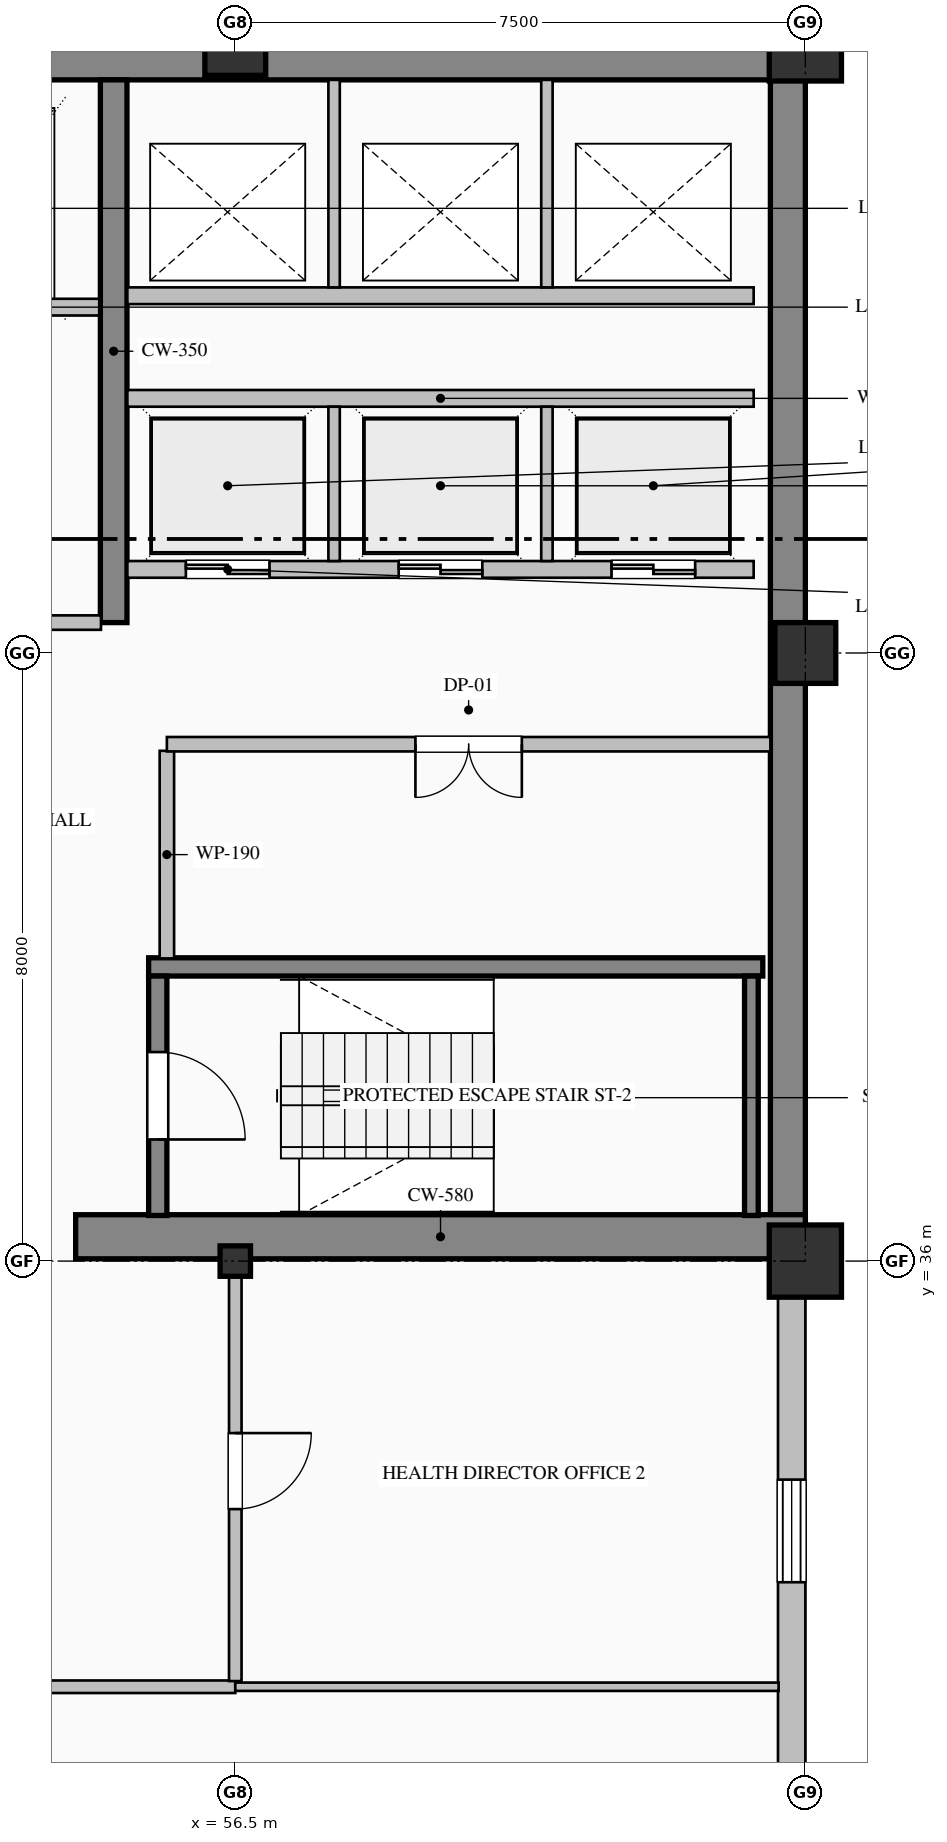
"""IFC4 building model, lengths in metres.
Left out: names, types, materials, properties, quantities, classifications, styles, units other than length and angle.
Written with IfcOpenShell. Run it as: python <this file> out.ifc"""

import sys

from ifc_helpers import new_model, si_unit, direction, frame, frame_2d, origin, origin_2d, place, context, subcontext, project, spatial, rectangle, hollow_rectangle, i_section, extrude, element, fill, save


model = new_model("IFC4")
c1 = context("Model", 3, precision=1e-05, world=origin(), true_north=direction((0.0, 1.0)))
c2 = subcontext(c1, "Body", "Model", "MODEL_VIEW")
j1 = project(units=[si_unit("LENGTHUNIT", "METRE"), si_unit("PLANEANGLEUNIT", "RADIAN")], contexts=[c1])
p1 = place(None, origin())
s1 = spatial("IfcSite", under=j1, at=p1, CompositionType="ELEMENT")
p2 = place(p1, origin())
s2 = spatial("IfcBuilding", under=s1, at=p2, CompositionType="ELEMENT")
p3 = place(p2, frame((0.0, 0.0, 253.8)))
s3 = spatial("IfcBuildingStorey", under=s2, at=p3, CompositionType="ELEMENT", Elevation=253.8)
p4 = place(p3, frame((40.5, 51.77, 0.0), z_axis=(0.0, 0.0, 1.0), x_axis=(1.0, 0.0, 0.0)))
e1 = element("IfcWall", 1, at=p4, inside=s3, PredefinedType="SHEAR", context=c2, shape_type="SweptSolid", body=[
    extrude(rectangle(XDim=23.5, YDim=0.46, at=frame_2d((11.75, 0.0))), origin(), (0.0, 0.0, 1.0), 3.775),
])
p5 = place(p3, frame((63.77, 36.32, 0.0), z_axis=(0.0, 0.0, 1.0), x_axis=(0.0, 1.0, 0.0)))
e2 = element("IfcWall", 2, at=p5, inside=s3, PredefinedType="SHEAR", context=c2, shape_type="SweptSolid", body=[
    extrude(rectangle(XDim=15.22, YDim=0.46, at=frame_2d((7.61, 0.0))), origin(), (0.0, 0.0, 1.0), 3.775),
])
p6 = place(p3, frame((54.4, 36.32, 0.0), z_axis=(0.0, 0.0, 1.0), x_axis=(1.0, 0.0, 0.0)))
e3 = element("IfcWall", 3, at=p6, inside=s3, PredefinedType="SHEAR", context=c2, shape_type="SweptSolid", body=[
    extrude(rectangle(XDim=9.6, YDim=0.58, at=frame_2d((4.8, 0.0))), origin(), (0.0, 0.0, 1.0), 4.0),
])
p7 = place(p3, frame((54.9, 44.4, 0.0), z_axis=(0.0, 0.0, 1.0), x_axis=(0.0, 1.0, 0.0)))
e4 = element("IfcWall", 4, at=p7, inside=s3, PredefinedType="SHEAR", context=c2, shape_type="SweptSolid", body=[
    extrude(rectangle(XDim=7.14, YDim=0.35, at=frame_2d((3.57, 0.0))), origin(), (0.0, 0.0, 1.0), 3.775),
])
p8 = place(p3, frame((56.5, 36.0, 0.0), z_axis=(0.0, 0.0, 1.0), x_axis=(1.0, 0.0, 0.0)))
e5 = element("IfcColumn", 5, at=p8, inside=s3, PredefinedType="COLUMN", context=c2, shape_type="SweptSolid", body=[
    extrude(i_section(OverallWidth=0.4, OverallDepth=0.4, WebThickness=0.013, FlangeThickness=0.021, FilletRadius=0.022, at=origin_2d()), origin(), (0.0, 0.0, 1.0), 4.0),
])
p9 = place(p3, frame((56.5, 52.0, 0.0), z_axis=(0.0, 0.0, 1.0), x_axis=(1.0, 0.0, 0.0)))
e6 = element("IfcColumn", 6, at=p9, inside=s3, PredefinedType="COLUMN", context=c2, shape_type="SweptSolid", body=[
    extrude(hollow_rectangle(XDim=0.8, YDim=0.8, WallThickness=0.032, at=origin_2d()), origin(), (0.0, 0.0, 1.0), 4.0),
])
p10 = place(p3, frame((64.0, 36.0, 0.0), z_axis=(0.0, 0.0, 1.0), x_axis=(1.0, 0.0, 0.0)))
e7 = element("IfcColumn", 7, at=p10, inside=s3, PredefinedType="COLUMN", context=c2, shape_type="SweptSolid", body=[
    extrude(hollow_rectangle(XDim=0.95, YDim=0.95, WallThickness=0.036, at=origin_2d()), origin(), (0.0, 0.0, 1.0), 4.0),
])
p11 = place(p3, frame((64.0, 44.0, 0.0), z_axis=(0.0, 0.0, 1.0), x_axis=(1.0, 0.0, 0.0)))
e8 = element("IfcColumn", 8, at=p11, inside=s3, PredefinedType="COLUMN", context=c2, shape_type="SweptSolid", body=[
    extrude(hollow_rectangle(XDim=0.8, YDim=0.8, WallThickness=0.032, at=origin_2d()), origin(), (0.0, 0.0, 1.0), 4.0),
])
p12 = place(p3, frame((64.0, 52.0, 0.0), z_axis=(0.0, 0.0, 1.0), x_axis=(1.0, 0.0, 0.0)))
e9 = element("IfcColumn", 9, at=p12, inside=s3, PredefinedType="COLUMN", context=c2, shape_type="SweptSolid", body=[
    extrude(hollow_rectangle(XDim=0.95, YDim=0.95, WallThickness=0.036, at=origin_2d()), origin(), (0.0, 0.0, 1.0), 4.0),
])
p13 = place(p3, frame((63.82, 36.05, 0.0), z_axis=(0.0, 0.0, 1.0), x_axis=(0.0, -1.0, 0.0)))
e10 = element("IfcWall", 10, at=p13, inside=s3, PredefinedType="SOLIDWALL", context=c2, shape_type="SweptSolid", body=[
    extrude(rectangle(XDim=19.55, YDim=0.36, at=frame_2d((9.775, 0.0))), origin(), (0.0, 0.0, 1.0), 3.325),
])
p14 = place(p13, frame((2.925, 0.0, 0.9)))
e11 = element("IfcOpeningElement", 11, at=p14, cuts=e10, PredefinedType="OPENING", context=c2, shape_type="SweptSolid", body=[
    extrude(rectangle(XDim=1.35, YDim=1.85, at=frame_2d((0.675, 0.925))), frame((0.0, 0.19, 0.0), z_axis=(0.0, -1.0, 0.0), x_axis=(1.0, 0.0, 0.0)), (0.0, 0.0, 1.0), 0.38),
])
p15 = place(p13, frame((10.2, 0.0, 0.9)))
e12 = element("IfcOpeningElement", 12, at=p15, cuts=e10, PredefinedType="OPENING", context=c2, shape_type="SweptSolid", body=[
    extrude(rectangle(XDim=1.2, YDim=1.85, at=frame_2d((0.6, 0.925))), frame((0.0, 0.19, 0.0), z_axis=(0.0, -1.0, 0.0), x_axis=(1.0, 0.0, 0.0)), (0.0, 0.0, 1.0), 0.38),
])
p16 = place(p13, frame((13.725, 0.0, 0.9)))
e13 = element("IfcOpeningElement", 13, at=p16, cuts=e10, PredefinedType="OPENING", context=c2, shape_type="SweptSolid", body=[
    extrude(rectangle(XDim=1.35, YDim=1.85, at=frame_2d((0.675, 0.925))), frame((0.0, 0.19, 0.0), z_axis=(0.0, -1.0, 0.0), x_axis=(1.0, 0.0, 0.0)), (0.0, 0.0, 1.0), 0.38),
])
p17 = place(p3, frame((55.36, 39.87, 0.0), z_axis=(0.0, 0.0, 1.0), x_axis=(1.0, 0.0, 0.0)))
e14 = element("IfcWall", 14, at=p17, inside=s3, PredefinedType="SOLIDWALL", context=c2, shape_type="SweptSolid", body=[
    extrude(rectangle(XDim=8.08, YDim=0.24, at=frame_2d((4.04, 0.0))), origin(), (0.0, 0.0, 1.0), 4.0),
])
p18 = place(p3, frame((55.48, 39.75, 0.0), z_axis=(0.0, 0.0, 1.0), x_axis=(0.0, -1.0, 0.0)))
e15 = element("IfcWall", 15, at=p18, inside=s3, PredefinedType="SOLIDWALL", context=c2, shape_type="SweptSolid", body=[
    extrude(rectangle(XDim=3.15, YDim=0.24, at=frame_2d((1.575, 0.0))), origin(), (0.0, 0.0, 1.0), 4.0),
])
p19 = place(p18, frame((1.0, 0.0, 0.0)))
e16 = element("IfcOpeningElement", 16, at=p19, cuts=e15, PredefinedType="OPENING", context=c2, shape_type="SweptSolid", body=[
    extrude(rectangle(XDim=1.15, YDim=2.2, at=frame_2d((0.575, 1.1))), frame((0.0, 0.13, 0.0), z_axis=(0.0, -1.0, 0.0), x_axis=(1.0, 0.0, 0.0)), (0.0, 0.0, 1.0), 0.26),
])
p20 = place(p3, frame((63.29, 36.6, 0.0), z_axis=(0.0, 0.0, 1.0), x_axis=(0.0, 1.0, 0.0)))
e17 = element("IfcWall", 17, at=p20, inside=s3, PredefinedType="SOLIDWALL", context=c2, shape_type="SweptSolid", body=[
    extrude(rectangle(XDim=3.15, YDim=0.18, at=frame_2d((1.575, 0.0))), origin(), (0.0, 0.0, 1.0), 4.0),
])
p21 = place(p3, frame((54.71, 48.55, 0.0), z_axis=(0.0, 0.0, 1.0), x_axis=(-1.0, 0.0, 0.0)))
e18 = element("IfcWall", 18, at=p21, inside=s3, PredefinedType="PARTITIONING", context=c2, shape_type="SweptSolid", body=[
    extrude(rectangle(XDim=5.12, YDim=0.22, at=frame_2d((2.56, 0.0))), origin(), (0.0, 0.0, 1.0), 3.775),
])
p22 = place(p21, frame((3.735, 0.0, 0.0)))
e19 = element("IfcOpeningElement", 19, at=p22, cuts=e18, PredefinedType="OPENING", context=c2, shape_type="SweptSolid", body=[
    extrude(rectangle(XDim=1.15, YDim=2.2, at=frame_2d((0.575, 1.1))), frame((0.0, 0.12, 0.0), z_axis=(0.0, -1.0, 0.0), x_axis=(1.0, 0.0, 0.0)), (0.0, 0.0, 1.0), 0.24),
])
p23 = place(p21, frame((0.935, 0.0, 0.0)))
e20 = element("IfcOpeningElement", 20, at=p23, cuts=e18, PredefinedType="OPENING", context=c2, shape_type="SweptSolid", body=[
    extrude(rectangle(XDim=1.15, YDim=2.2, at=frame_2d((0.575, 1.1))), frame((0.0, 0.12, 0.0), z_axis=(0.0, -1.0, 0.0), x_axis=(1.0, 0.0, 0.0)), (0.0, 0.0, 1.0), 0.24),
])
p24 = place(p3, frame((63.32, 45.1, 0.0), z_axis=(0.0, 0.0, 1.0), x_axis=(-1.0, 0.0, 0.0)))
e21 = element("IfcWall", 21, at=p24, inside=s3, PredefinedType="PARTITIONING", context=c2, shape_type="SweptSolid", body=[
    extrude(rectangle(XDim=8.24, YDim=0.22, at=frame_2d((4.12, 0.0))), origin(), (0.0, 0.0, 1.0), 3.775),
])
p25 = place(p24, frame((6.37, 0.0, 0.0)))
e22 = element("IfcOpeningElement", 22, at=p25, cuts=e21, PredefinedType="OPENING", context=c2, shape_type="SweptSolid", body=[
    extrude(rectangle(XDim=1.1, YDim=2.2, at=frame_2d((0.55, 1.1))), frame((0.0, 0.12, 0.0), z_axis=(0.0, -1.0, 0.0), x_axis=(1.0, 0.0, 0.0)), (0.0, 0.0, 1.0), 0.24),
])
p26 = place(p24, frame((3.57, 0.0, 0.0)))
e23 = element("IfcOpeningElement", 23, at=p26, cuts=e21, PredefinedType="OPENING", context=c2, shape_type="SweptSolid", body=[
    extrude(rectangle(XDim=1.1, YDim=2.2, at=frame_2d((0.55, 1.1))), frame((0.0, 0.12, 0.0), z_axis=(0.0, -1.0, 0.0), x_axis=(1.0, 0.0, 0.0)), (0.0, 0.0, 1.0), 0.24),
])
p27 = place(p24, frame((0.77, 0.0, 0.0)))
e24 = element("IfcOpeningElement", 24, at=p27, cuts=e21, PredefinedType="OPENING", context=c2, shape_type="SweptSolid", body=[
    extrude(rectangle(XDim=1.1, YDim=2.2, at=frame_2d((0.55, 1.1))), frame((0.0, 0.12, 0.0), z_axis=(0.0, -1.0, 0.0), x_axis=(1.0, 0.0, 0.0)), (0.0, 0.0, 1.0), 0.24),
])
p28 = place(p3, frame((55.08, 47.35, 0.0), z_axis=(0.0, 0.0, 1.0), x_axis=(1.0, 0.0, 0.0)))
e25 = element("IfcWall", 25, at=p28, inside=s3, PredefinedType="PARTITIONING", context=c2, shape_type="SweptSolid", body=[
    extrude(rectangle(XDim=8.24, YDim=0.22, at=frame_2d((4.12, 0.0))), origin(), (0.0, 0.0, 1.0), 3.775),
])
for number, where, z_axis, x_axis in (
    (26, (57.8, 45.21, 0.0), (0.0, 0.0, 1.0), (0.0, 1.0, 0.0)),
    (27, (60.6, 45.21, 0.0), (0.0, 0.0, 1.0), (0.0, 1.0, 0.0)),
):
    element("IfcWall", number, at=place(p3, frame(where, z_axis=z_axis, x_axis=x_axis)), inside=s3, PredefinedType="PARTITIONING", context=c2, shape_type="SweptSolid", body=[
        extrude(rectangle(XDim=2.03, YDim=0.15, at=frame_2d((1.015, 0.0))), origin(), (0.0, 0.0, 1.0), 3.775),
    ])
p29 = place(p3, frame((63.32, 48.7, 0.0), z_axis=(0.0, 0.0, 1.0), x_axis=(-1.0, 0.0, 0.0)))
e28 = element("IfcWall", 28, at=p29, inside=s3, PredefinedType="PARTITIONING", context=c2, shape_type="SweptSolid", body=[
    extrude(rectangle(XDim=8.24, YDim=0.22, at=frame_2d((4.12, 0.0))), origin(), (0.0, 0.0, 1.0), 3.775),
])
for number, where, z_axis, x_axis in (
    (29, (57.8, 48.81, 0.0), (0.0, 0.0, 1.0), (0.0, 1.0, 0.0)),
    (30, (60.6, 48.81, 0.0), (0.0, 0.0, 1.0), (0.0, 1.0, 0.0)),
):
    element("IfcWall", number, at=place(p3, frame(where, z_axis=z_axis, x_axis=x_axis)), inside=s3, PredefinedType="PARTITIONING", context=c2, shape_type="SweptSolid", body=[
        extrude(rectangle(XDim=2.73, YDim=0.15, at=frame_2d((1.365, 0.0))), origin(), (0.0, 0.0, 1.0), 3.775),
    ])
p30 = place(p3, frame((54.733, 44.4, 0.0), z_axis=(0.0, 0.0, 1.0), x_axis=(-1.0, 0.0, 0.0)))
e31 = element("IfcWall", 31, at=p30, inside=s3, PredefinedType="PARTITIONING", context=c2, shape_type="SweptSolid", body=[
    extrude(rectangle(XDim=5.166, YDim=0.19, at=frame_2d((2.583, 0.0))), origin(), (0.0, 0.0, 1.0), 3.775),
])
p31 = place(p30, frame((2.058, 0.0, 0.0)))
e32 = element("IfcOpeningElement", 32, at=p31, cuts=e31, PredefinedType="OPENING", context=c2, shape_type="SweptSolid", body=[
    extrude(rectangle(XDim=1.05, YDim=2.15, at=frame_2d((0.525, 1.075))), frame((0.0, 0.105, 0.0), z_axis=(0.0, -1.0, 0.0), x_axis=(1.0, 0.0, 0.0)), (0.0, 0.0, 1.0), 0.21),
])
p32 = place(p3, frame((55.6, 42.713, 0.0), z_axis=(0.0, 0.0, 1.0), x_axis=(0.0, -1.0, 0.0)))
e33 = element("IfcWall", 33, at=p32, inside=s3, PredefinedType="PARTITIONING", context=c2, shape_type="SweptSolid", body=[
    extrude(rectangle(XDim=2.731, YDim=0.19, at=frame_2d((1.365, 0.0))), origin(), (0.0, 0.0, 1.0), 3.775),
])
p33 = place(p3, frame((63.54, 42.8, 0.0), z_axis=(0.0, 0.0, 1.0), x_axis=(-1.0, 0.0, 0.0)))
e34 = element("IfcWall", 34, at=p33, inside=s3, PredefinedType="PARTITIONING", context=c2, shape_type="SweptSolid", body=[
    extrude(rectangle(XDim=7.94, YDim=0.19, at=frame_2d((3.97, 0.0))), origin(), (0.0, 0.0, 1.0), 3.775),
])
p34 = place(p33, frame((3.27, 0.0, 0.0)))
e35 = element("IfcOpeningElement", 35, at=p34, cuts=e34, PredefinedType="OPENING", context=c2, shape_type="SweptSolid", body=[
    extrude(rectangle(XDim=1.4, YDim=2.25, at=frame_2d((0.7, 1.125))), frame((0.0, 0.105, 0.0), z_axis=(0.0, -1.0, 0.0), x_axis=(1.0, 0.0, 0.0)), (0.0, 0.0, 1.0), 0.21),
])
p35 = place(p3, frame((56.5, 30.4, 0.0), z_axis=(0.0, 0.0, 1.0), x_axis=(-1.0, 0.0, 0.0)))
e36 = element("IfcWall", 36, at=p35, inside=s3, PredefinedType="PARTITIONING", context=c2, shape_type="SweptSolid", body=[
    extrude(rectangle(XDim=11.3, YDim=0.165, at=frame_2d((5.65, 0.0))), origin(), (0.0, 0.0, 1.0), 3.775),
])
p36 = place(p3, frame((56.5, 36.0, 0.0), z_axis=(0.0, 0.0, 1.0), x_axis=(0.0, -1.0, 0.0)))
e37 = element("IfcWall", 37, at=p36, inside=s3, PredefinedType="PARTITIONING", context=c2, shape_type="SweptSolid", body=[
    extrude(rectangle(XDim=5.525, YDim=0.165, at=frame_2d((2.763, 0.0))), origin(), (0.0, 0.0, 1.0), 3.179),
])
p37 = place(p36, frame((2.263, 0.0, 0.0)))
e38 = element("IfcOpeningElement", 38, at=p37, cuts=e37, PredefinedType="OPENING", context=c2, shape_type="SweptSolid", body=[
    extrude(rectangle(XDim=1.0, YDim=2.15, at=frame_2d((0.5, 1.075))), frame((0.0, 0.093, 0.0), z_axis=(0.0, -1.0, 0.0), x_axis=(1.0, 0.0, 0.0)), (0.0, 0.0, 1.0), 0.185),
])
p38 = place(p3, frame((56.5, 30.4, 0.0), z_axis=(0.0, 0.0, 1.0), x_axis=(1.0, 0.0, 0.0)))
e39 = element("IfcWall", 39, at=p38, inside=s3, PredefinedType="MOVABLE", context=c2, shape_type="SweptSolid", body=[
    extrude(rectangle(XDim=7.148, YDim=0.11, at=frame_2d((3.574, 0.0))), origin(), (0.0, 0.0, 1.0), 3.775),
])
p39 = place(p14, origin())
e40 = element("IfcWindow", 40, at=p39, inside=s3, PartitioningType="DOUBLE_PANEL_VERTICAL", PredefinedType="WINDOW", context=c2, shape_type="SweptSolid", body=[
    extrude(rectangle(XDim=1.35, YDim=1.85, at=frame_2d((0.675, 0.925))), frame((0.0, 0.15, 0.0), z_axis=(0.0, -1.0, 0.0), x_axis=(1.0, 0.0, 0.0)), (0.0, 0.0, 1.0), 0.06),
])
fill(e11, e40)
p40 = place(p19, origin())
e41 = element("IfcDoor", 41, at=p40, inside=s3, OperationType="SINGLE_SWING_RIGHT", PredefinedType="DOOR", context=c2, shape_type="SweptSolid", body=[
    extrude(rectangle(XDim=1.15, YDim=2.2, at=frame_2d((0.575, 1.1))), frame((0.0, 0.025, 0.0), z_axis=(0.0, -1.0, 0.0), x_axis=(1.0, 0.0, 0.0)), (0.0, 0.0, 1.0), 0.05),
])
fill(e16, e41)
p41 = place(p25, origin())
e42 = element("IfcDoor", 42, at=p41, inside=s3, OperationType="DOUBLE_DOOR_SLIDING", PredefinedType="DOOR", context=c2, shape_type="SweptSolid", body=[
    extrude(rectangle(XDim=1.1, YDim=2.2, at=frame_2d((0.55, 1.1))), frame((0.0, 0.025, 0.0), z_axis=(0.0, -1.0, 0.0), x_axis=(1.0, 0.0, 0.0)), (0.0, 0.0, 1.0), 0.05),
])
fill(e22, e42)
p42 = place(p26, origin())
e43 = element("IfcDoor", 43, at=p42, inside=s3, OperationType="DOUBLE_DOOR_SLIDING", PredefinedType="DOOR", context=c2, shape_type="SweptSolid", body=[
    extrude(rectangle(XDim=1.1, YDim=2.2, at=frame_2d((0.55, 1.1))), frame((0.0, 0.025, 0.0), z_axis=(0.0, -1.0, 0.0), x_axis=(1.0, 0.0, 0.0)), (0.0, 0.0, 1.0), 0.05),
])
fill(e23, e43)
p43 = place(p27, origin())
e44 = element("IfcDoor", 44, at=p43, inside=s3, OperationType="DOUBLE_DOOR_SLIDING", PredefinedType="DOOR", context=c2, shape_type="SweptSolid", body=[
    extrude(rectangle(XDim=1.1, YDim=2.2, at=frame_2d((0.55, 1.1))), frame((0.0, 0.025, 0.0), z_axis=(0.0, -1.0, 0.0), x_axis=(1.0, 0.0, 0.0)), (0.0, 0.0, 1.0), 0.05),
])
fill(e24, e44)
p44 = place(p34, origin())
e45 = element("IfcDoor", 45, at=p44, inside=s3, OperationType="DOUBLE_DOOR_SINGLE_SWING", PredefinedType="DOOR", context=c2, shape_type="SweptSolid", body=[
    extrude(rectangle(XDim=1.4, YDim=2.25, at=frame_2d((0.7, 1.125))), frame((0.0, 0.025, 0.0), z_axis=(0.0, -1.0, 0.0), x_axis=(1.0, 0.0, 0.0)), (0.0, 0.0, 1.0), 0.05),
])
fill(e35, e45)
p45 = place(p37, origin())
e46 = element("IfcDoor", 46, at=p45, inside=s3, OperationType="SINGLE_SWING_LEFT", PredefinedType="DOOR", context=c2, shape_type="SweptSolid", body=[
    extrude(rectangle(XDim=1.0, YDim=2.15, at=frame_2d((0.5, 1.075))), frame((0.0, 0.025, 0.0), z_axis=(0.0, -1.0, 0.0), x_axis=(1.0, 0.0, 0.0)), (0.0, 0.0, 1.0), 0.05),
])
fill(e38, e46)
save(model, sys.argv[1])
